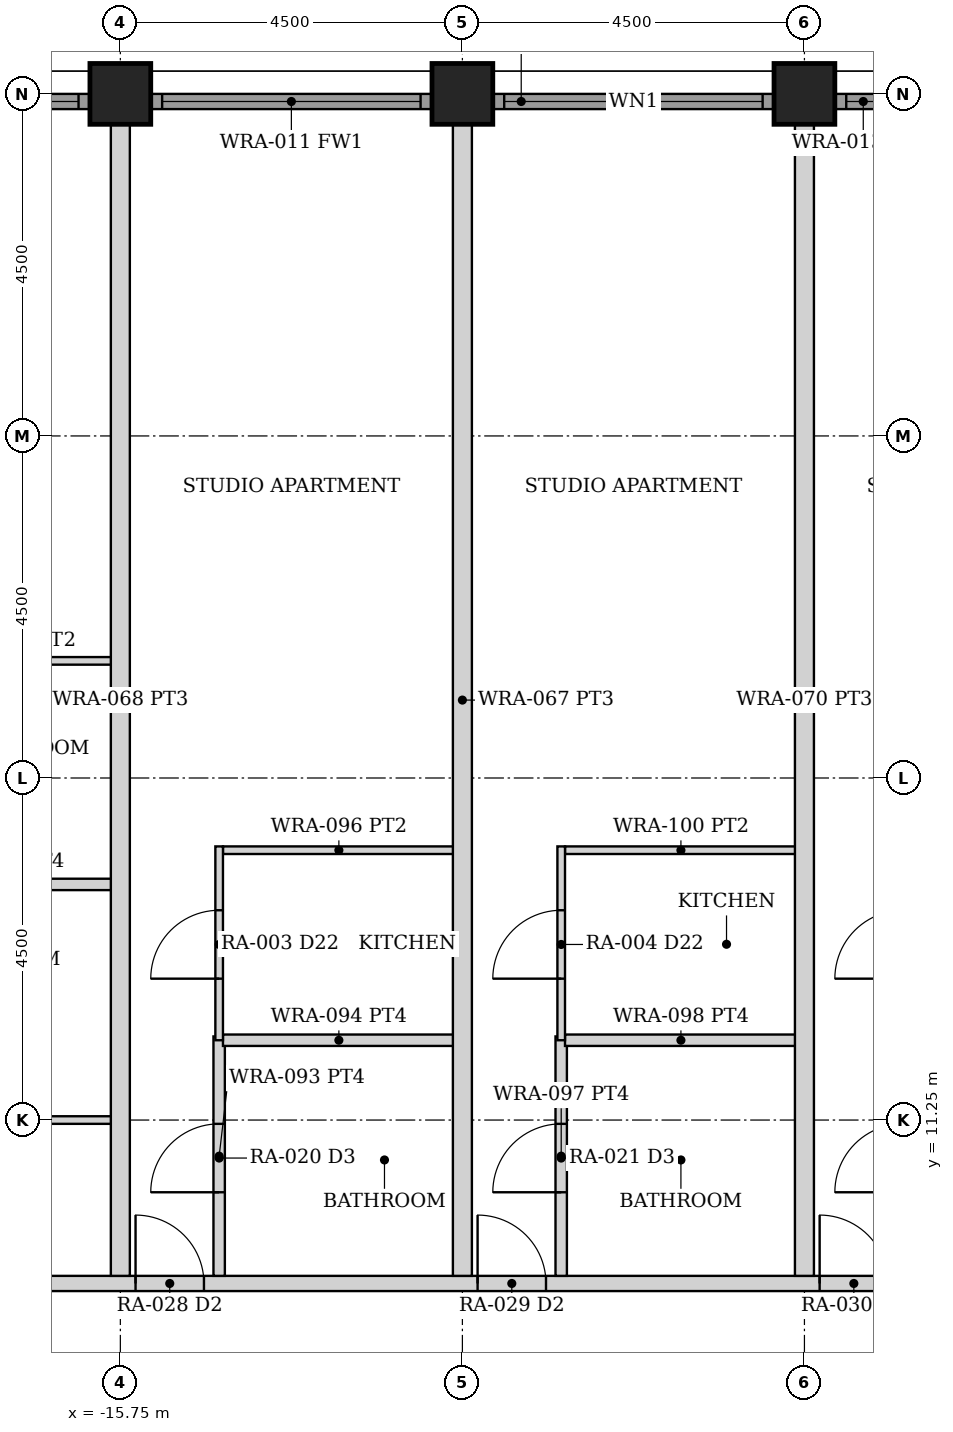
"""IFC4 building model, lengths in metres.
Left out: names, types, materials, properties, quantities, classifications, styles, units other than length and angle.
Written with IfcOpenShell. Run it as: python <this file> out.ifc"""

import sys

from ifc_helpers import new_model, si_unit, direction, frame, frame_2d, origin, origin_2d, place, context, subcontext, project, spatial, rectangle, hollow_rectangle, extrude, element, fill, save


model = new_model("IFC4")
c1 = context("Model", 3, precision=1e-05, world=origin(), true_north=direction((0.0, 1.0)))
c2 = subcontext(c1, "Body", "Model", "MODEL_VIEW")
j1 = project(units=[si_unit("LENGTHUNIT", "METRE"), si_unit("PLANEANGLEUNIT", "RADIAN")], contexts=[c1])
p1 = place(None, origin())
s1 = spatial("IfcSite", under=j1, at=p1, CompositionType="ELEMENT")
p2 = place(p1, origin())
s2 = spatial("IfcBuilding", under=s1, at=p2, CompositionType="ELEMENT")
p3 = place(p2, frame((0.0, 0.0, 26.5)))
s3 = spatial("IfcBuildingStorey", under=s2, at=p3, CompositionType="ELEMENT", Elevation=26.5)
for number, where, z_axis, x_axis in (
    (1, (-15.75, 24.75, 0.0), (0.0, 0.0, 1.0), (0.0, 1.0, 0.0)),
    (2, (-11.25, 24.75, 0.0), (0.0, 0.0, 1.0), (0.0, 1.0, 0.0)),
    (3, (-6.75, 24.75, 0.0), (0.0, 0.0, 1.0), (0.0, 1.0, 0.0)),
):
    element("IfcColumn", number, at=place(p3, frame(where, z_axis=z_axis, x_axis=x_axis)), inside=s3, PredefinedType="COLUMN", context=c2, shape_type="SweptSolid", body=[
        extrude(hollow_rectangle(XDim=0.8, YDim=0.8, WallThickness=0.08, at=origin_2d()), origin(), (0.0, 0.0, 1.0), 3.5),
    ])
p4 = place(p3, frame((-19.845, 24.65, 0.0), z_axis=(0.0, 0.0, 1.0), x_axis=(1.0, 0.0, 0.0)))
e4 = element("IfcWall", 4, at=p4, inside=s3, PredefinedType="SOLIDWALL", context=c2, shape_type="SweptSolid", body=[
    extrude(rectangle(XDim=3.69, YDim=0.2, at=frame_2d((1.845, 0.0))), origin(), (0.0, 0.0, 1.0), 2.379),
])
p5 = place(p4, frame((0.145, 0.0, 0.3)))
e5 = element("IfcOpeningElement", 5, at=p5, cuts=e4, PredefinedType="OPENING", context=c2, shape_type="SweptSolid", body=[
    extrude(rectangle(XDim=3.4, YDim=1.929, at=frame_2d((1.7, 0.964))), frame((0.0, 0.11, 0.0), z_axis=(0.0, -1.0, 0.0), x_axis=(1.0, 0.0, 0.0)), (0.0, 0.0, 1.0), 0.22),
])
p6 = place(p3, frame((-15.345, 24.65, 0.0), z_axis=(0.0, 0.0, 1.0), x_axis=(1.0, 0.0, 0.0)))
e6 = element("IfcWall", 6, at=p6, inside=s3, PredefinedType="SOLIDWALL", context=c2, shape_type="SweptSolid", body=[
    extrude(rectangle(XDim=3.69, YDim=0.2, at=frame_2d((1.845, 0.0))), origin(), (0.0, 0.0, 1.0), 2.379),
])
p7 = place(p6, frame((0.145, 0.0, 0.3)))
e7 = element("IfcOpeningElement", 7, at=p7, cuts=e6, PredefinedType="OPENING", context=c2, shape_type="SweptSolid", body=[
    extrude(rectangle(XDim=3.4, YDim=1.929, at=frame_2d((1.7, 0.964))), frame((0.0, 0.11, 0.0), z_axis=(0.0, -1.0, 0.0), x_axis=(1.0, 0.0, 0.0)), (0.0, 0.0, 1.0), 0.22),
])
p8 = place(p3, frame((-10.845, 24.65, 0.0), z_axis=(0.0, 0.0, 1.0), x_axis=(1.0, 0.0, 0.0)))
e8 = element("IfcWall", 8, at=p8, inside=s3, PredefinedType="SOLIDWALL", context=c2, shape_type="SweptSolid", body=[
    extrude(rectangle(XDim=3.69, YDim=0.2, at=frame_2d((1.845, 0.0))), origin(), (0.0, 0.0, 1.0), 2.379),
])
p9 = place(p8, frame((0.145, 0.0, 0.3)))
e9 = element("IfcOpeningElement", 9, at=p9, cuts=e8, PredefinedType="OPENING", context=c2, shape_type="SweptSolid", body=[
    extrude(rectangle(XDim=3.4, YDim=1.929, at=frame_2d((1.7, 0.964))), frame((0.0, 0.11, 0.0), z_axis=(0.0, -1.0, 0.0), x_axis=(1.0, 0.0, 0.0)), (0.0, 0.0, 1.0), 0.22),
])
p10 = place(p3, frame((-6.345, 24.65, 0.0), z_axis=(0.0, 0.0, 1.0), x_axis=(1.0, 0.0, 0.0)))
e10 = element("IfcWall", 10, at=p10, inside=s3, PredefinedType="SOLIDWALL", context=c2, shape_type="SweptSolid", body=[
    extrude(rectangle(XDim=3.69, YDim=0.2, at=frame_2d((1.845, 0.0))), origin(), (0.0, 0.0, 1.0), 2.379),
])
p11 = place(p10, frame((0.145, 0.0, 0.3)))
e11 = element("IfcOpeningElement", 11, at=p11, cuts=e10, PredefinedType="OPENING", context=c2, shape_type="SweptSolid", body=[
    extrude(rectangle(XDim=3.4, YDim=1.929, at=frame_2d((1.7, 0.964))), frame((0.0, 0.11, 0.0), z_axis=(0.0, -1.0, 0.0), x_axis=(1.0, 0.0, 0.0)), (0.0, 0.0, 1.0), 0.22),
])
p12 = place(p3, frame((-24.55, 9.1, 0.0), z_axis=(0.0, 0.0, 1.0), x_axis=(1.0, 0.0, 0.0)))
e12 = element("IfcWall", 12, at=p12, inside=s3, PredefinedType="PARTITIONING", context=c2, shape_type="SweptSolid", body=[
    extrude(rectangle(XDim=49.1, YDim=0.2, at=frame_2d((24.55, 0.0))), origin(), (0.0, 0.0, 1.0), 2.373),
])
p13 = place(p12, frame((5.1, 0.0, 0.0)))
e13 = element("IfcOpeningElement", 13, at=p13, cuts=e12, PredefinedType="OPENING", context=c2, shape_type="SweptSolid", body=[
    extrude(rectangle(XDim=0.9, YDim=2.1, at=frame_2d((0.45, 1.05))), frame((0.0, 0.11, 0.0), z_axis=(0.0, -1.0, 0.0), x_axis=(1.0, 0.0, 0.0)), (0.0, 0.0, 1.0), 0.22),
])
p14 = place(p12, frame((9.0, 0.0, 0.0)))
e14 = element("IfcOpeningElement", 14, at=p14, cuts=e12, PredefinedType="OPENING", context=c2, shape_type="SweptSolid", body=[
    extrude(rectangle(XDim=0.9, YDim=2.1, at=frame_2d((0.45, 1.05))), frame((0.0, 0.11, 0.0), z_axis=(0.0, -1.0, 0.0), x_axis=(1.0, 0.0, 0.0)), (0.0, 0.0, 1.0), 0.22),
])
p15 = place(p12, frame((13.5, 0.0, 0.0)))
e15 = element("IfcOpeningElement", 15, at=p15, cuts=e12, PredefinedType="OPENING", context=c2, shape_type="SweptSolid", body=[
    extrude(rectangle(XDim=0.9, YDim=2.1, at=frame_2d((0.45, 1.05))), frame((0.0, 0.11, 0.0), z_axis=(0.0, -1.0, 0.0), x_axis=(1.0, 0.0, 0.0)), (0.0, 0.0, 1.0), 0.22),
])
p16 = place(p12, frame((18.0, 0.0, 0.0)))
e16 = element("IfcOpeningElement", 16, at=p16, cuts=e12, PredefinedType="OPENING", context=c2, shape_type="SweptSolid", body=[
    extrude(rectangle(XDim=0.9, YDim=2.1, at=frame_2d((0.45, 1.05))), frame((0.0, 0.11, 0.0), z_axis=(0.0, -1.0, 0.0), x_axis=(1.0, 0.0, 0.0)), (0.0, 0.0, 1.0), 0.22),
])
p17 = place(p12, frame((22.5, 0.0, 0.0)))
e17 = element("IfcOpeningElement", 17, at=p17, cuts=e12, PredefinedType="OPENING", context=c2, shape_type="SweptSolid", body=[
    extrude(rectangle(XDim=0.9, YDim=2.1, at=frame_2d((0.45, 1.05))), frame((0.0, 0.11, 0.0), z_axis=(0.0, -1.0, 0.0), x_axis=(1.0, 0.0, 0.0)), (0.0, 0.0, 1.0), 0.22),
])
p18 = place(p12, frame((27.0, 0.0, 0.0)))
e18 = element("IfcOpeningElement", 18, at=p18, cuts=e12, PredefinedType="OPENING", context=c2, shape_type="SweptSolid", body=[
    extrude(rectangle(XDim=0.9, YDim=2.1, at=frame_2d((0.45, 1.05))), frame((0.0, 0.11, 0.0), z_axis=(0.0, -1.0, 0.0), x_axis=(1.0, 0.0, 0.0)), (0.0, 0.0, 1.0), 0.22),
])
p19 = place(p12, frame((31.5, 0.0, 0.0)))
e19 = element("IfcOpeningElement", 19, at=p19, cuts=e12, PredefinedType="OPENING", context=c2, shape_type="SweptSolid", body=[
    extrude(rectangle(XDim=0.9, YDim=2.1, at=frame_2d((0.45, 1.05))), frame((0.0, 0.11, 0.0), z_axis=(0.0, -1.0, 0.0), x_axis=(1.0, 0.0, 0.0)), (0.0, 0.0, 1.0), 0.22),
])
p20 = place(p12, frame((36.0, 0.0, 0.0)))
e20 = element("IfcOpeningElement", 20, at=p20, cuts=e12, PredefinedType="OPENING", context=c2, shape_type="SweptSolid", body=[
    extrude(rectangle(XDim=0.9, YDim=2.1, at=frame_2d((0.45, 1.05))), frame((0.0, 0.11, 0.0), z_axis=(0.0, -1.0, 0.0), x_axis=(1.0, 0.0, 0.0)), (0.0, 0.0, 1.0), 0.22),
])
p21 = place(p12, frame((43.1, 0.0, 0.0)))
e21 = element("IfcOpeningElement", 21, at=p21, cuts=e12, PredefinedType="OPENING", context=c2, shape_type="SweptSolid", body=[
    extrude(rectangle(XDim=0.9, YDim=2.1, at=frame_2d((0.45, 1.05))), frame((0.0, 0.11, 0.0), z_axis=(0.0, -1.0, 0.0), x_axis=(1.0, 0.0, 0.0)), (0.0, 0.0, 1.0), 0.22),
])
p22 = place(p3, frame((-24.35, 11.25, 0.0), z_axis=(0.0, 0.0, 1.0), x_axis=(1.0, 0.0, 0.0)))
e22 = element("IfcWall", 22, at=p22, inside=s3, PredefinedType="PARTITIONING", context=c2, shape_type="SweptSolid", body=[
    extrude(rectangle(XDim=8.5, YDim=0.1, at=frame_2d((4.25, 0.0))), origin(), (0.0, 0.0, 1.0), 2.373),
])
p23 = place(p22, frame((2.375, 0.0, 0.0)))
e23 = element("IfcOpeningElement", 23, at=p23, cuts=e22, PredefinedType="OPENING", context=c2, shape_type="SweptSolid", body=[
    extrude(rectangle(XDim=0.9, YDim=2.1, at=frame_2d((0.45, 1.05))), frame((0.0, 0.06, 0.0), z_axis=(0.0, -1.0, 0.0), x_axis=(1.0, 0.0, 0.0)), (0.0, 0.0, 1.0), 0.12),
])
p24 = place(p22, frame((0.35, 0.0, 0.0)))
e24 = element("IfcOpeningElement", 24, at=p24, cuts=e22, PredefinedType="OPENING", context=c2, shape_type="SweptSolid", body=[
    extrude(rectangle(XDim=0.9, YDim=2.1, at=frame_2d((0.45, 1.05))), frame((0.0, 0.06, 0.0), z_axis=(0.0, -1.0, 0.0), x_axis=(1.0, 0.0, 0.0)), (0.0, 0.0, 1.0), 0.12),
])
p25 = place(p22, frame((4.325, 0.0, 0.0)))
e25 = element("IfcOpeningElement", 25, at=p25, cuts=e22, PredefinedType="OPENING", context=c2, shape_type="SweptSolid", body=[
    extrude(rectangle(XDim=0.85, YDim=2.1, at=frame_2d((0.425, 1.05))), frame((0.0, 0.06, 0.0), z_axis=(0.0, -1.0, 0.0), x_axis=(1.0, 0.0, 0.0)), (0.0, 0.0, 1.0), 0.12),
])
p26 = place(p22, frame((6.52, 0.0, 0.0)))
e26 = element("IfcOpeningElement", 26, at=p26, cuts=e22, PredefinedType="OPENING", context=c2, shape_type="SweptSolid", body=[
    extrude(rectangle(XDim=0.9, YDim=2.1, at=frame_2d((0.45, 1.05))), frame((0.0, 0.06, 0.0), z_axis=(0.0, -1.0, 0.0), x_axis=(1.0, 0.0, 0.0)), (0.0, 0.0, 1.0), 0.12),
])
p27 = place(p3, frame((-18.95, 14.35, 0.0), z_axis=(0.0, 0.0, 1.0), x_axis=(1.0, 0.0, 0.0)))
e27 = element("IfcWall", 27, at=p27, inside=s3, PredefinedType="PARTITIONING", context=c2, shape_type="SweptSolid", body=[
    extrude(rectangle(XDim=3.14, YDim=0.15, at=frame_2d((1.57, 0.0))), origin(), (0.0, 0.0, 1.0), 2.373),
])
p28 = place(p3, frame((-18.95, 17.291, 0.0), z_axis=(0.0, 0.0, 1.0), x_axis=(1.0, 0.0, 0.0)))
e28 = element("IfcWall", 28, at=p28, inside=s3, PredefinedType="PARTITIONING", context=c2, shape_type="SweptSolid", body=[
    extrude(rectangle(XDim=3.14, YDim=0.1, at=frame_2d((1.57, 0.0))), origin(), (0.0, 0.0, 1.0), 2.373),
])
p29 = place(p3, frame((-14.45, 9.2, 0.0), z_axis=(0.0, 0.0, 1.0), x_axis=(0.0, 1.0, 0.0)))
e29 = element("IfcWall", 29, at=p29, inside=s3, PredefinedType="PARTITIONING", context=c2, shape_type="SweptSolid", body=[
    extrude(rectangle(XDim=3.15, YDim=0.15, at=frame_2d((1.575, 0.0))), origin(), (0.0, 0.0, 1.0), 2.373),
])
p30 = place(p29, frame((1.1, 0.0, 0.0)))
e30 = element("IfcOpeningElement", 30, at=p30, cuts=e29, PredefinedType="OPENING", context=c2, shape_type="SweptSolid", body=[
    extrude(rectangle(XDim=0.9, YDim=2.1, at=frame_2d((0.45, 1.05))), frame((0.0, 0.085, 0.0), z_axis=(0.0, -1.0, 0.0), x_axis=(1.0, 0.0, 0.0)), (0.0, 0.0, 1.0), 0.17),
])
p31 = place(p3, frame((-14.4, 12.3, 0.0), z_axis=(0.0, 0.0, 1.0), x_axis=(1.0, 0.0, 0.0)))
e31 = element("IfcWall", 31, at=p31, inside=s3, PredefinedType="PARTITIONING", context=c2, shape_type="SweptSolid", body=[
    extrude(rectangle(XDim=3.05, YDim=0.15, at=frame_2d((1.525, 0.0))), origin(), (0.0, 0.0, 1.0), 2.373),
])
p32 = place(p3, frame((-14.4, 14.8, 0.0), z_axis=(0.0, 0.0, 1.0), x_axis=(1.0, 0.0, 0.0)))
e32 = element("IfcWall", 32, at=p32, inside=s3, PredefinedType="PARTITIONING", context=c2, shape_type="SweptSolid", body=[
    extrude(rectangle(XDim=3.05, YDim=0.1, at=frame_2d((1.525, 0.0))), origin(), (0.0, 0.0, 1.0), 2.373),
])
p33 = place(p3, frame((-14.45, 12.3, 0.0), z_axis=(0.0, 0.0, 1.0), x_axis=(0.0, 1.0, 0.0)))
e33 = element("IfcWall", 33, at=p33, inside=s3, PredefinedType="PARTITIONING", context=c2, shape_type="SweptSolid", body=[
    extrude(rectangle(XDim=2.55, YDim=0.1, at=frame_2d((1.275, 0.0))), origin(), (0.0, 0.0, 1.0), 2.373),
])
p34 = place(p33, frame((0.81, 0.0, 0.0)))
e34 = element("IfcOpeningElement", 34, at=p34, cuts=e33, PredefinedType="OPENING", context=c2, shape_type="SweptSolid", body=[
    extrude(rectangle(XDim=0.9, YDim=2.1, at=frame_2d((0.45, 1.05))), frame((0.0, 0.06, 0.0), z_axis=(0.0, -1.0, 0.0), x_axis=(1.0, 0.0, 0.0)), (0.0, 0.0, 1.0), 0.12),
])
p35 = place(p3, frame((-9.95, 9.2, 0.0), z_axis=(0.0, 0.0, 1.0), x_axis=(0.0, 1.0, 0.0)))
e35 = element("IfcWall", 35, at=p35, inside=s3, PredefinedType="PARTITIONING", context=c2, shape_type="SweptSolid", body=[
    extrude(rectangle(XDim=3.15, YDim=0.15, at=frame_2d((1.575, 0.0))), origin(), (0.0, 0.0, 1.0), 2.373),
])
p36 = place(p35, frame((1.1, 0.0, 0.0)))
e36 = element("IfcOpeningElement", 36, at=p36, cuts=e35, PredefinedType="OPENING", context=c2, shape_type="SweptSolid", body=[
    extrude(rectangle(XDim=0.9, YDim=2.1, at=frame_2d((0.45, 1.05))), frame((0.0, 0.085, 0.0), z_axis=(0.0, -1.0, 0.0), x_axis=(1.0, 0.0, 0.0)), (0.0, 0.0, 1.0), 0.17),
])
p37 = place(p3, frame((-9.9, 12.3, 0.0), z_axis=(0.0, 0.0, 1.0), x_axis=(1.0, 0.0, 0.0)))
e37 = element("IfcWall", 37, at=p37, inside=s3, PredefinedType="PARTITIONING", context=c2, shape_type="SweptSolid", body=[
    extrude(rectangle(XDim=3.05, YDim=0.15, at=frame_2d((1.525, 0.0))), origin(), (0.0, 0.0, 1.0), 2.373),
])
p38 = place(p3, frame((-9.9, 14.8, 0.0), z_axis=(0.0, 0.0, 1.0), x_axis=(1.0, 0.0, 0.0)))
e38 = element("IfcWall", 38, at=p38, inside=s3, PredefinedType="PARTITIONING", context=c2, shape_type="SweptSolid", body=[
    extrude(rectangle(XDim=3.05, YDim=0.1, at=frame_2d((1.525, 0.0))), origin(), (0.0, 0.0, 1.0), 2.373),
])
p39 = place(p3, frame((-9.95, 12.3, 0.0), z_axis=(0.0, 0.0, 1.0), x_axis=(0.0, 1.0, 0.0)))
e39 = element("IfcWall", 39, at=p39, inside=s3, PredefinedType="PARTITIONING", context=c2, shape_type="SweptSolid", body=[
    extrude(rectangle(XDim=2.55, YDim=0.1, at=frame_2d((1.275, 0.0))), origin(), (0.0, 0.0, 1.0), 2.373),
])
p40 = place(p39, frame((0.81, 0.0, 0.0)))
e40 = element("IfcOpeningElement", 40, at=p40, cuts=e39, PredefinedType="OPENING", context=c2, shape_type="SweptSolid", body=[
    extrude(rectangle(XDim=0.9, YDim=2.1, at=frame_2d((0.45, 1.05))), frame((0.0, 0.06, 0.0), z_axis=(0.0, -1.0, 0.0), x_axis=(1.0, 0.0, 0.0)), (0.0, 0.0, 1.0), 0.12),
])
for number, where, z_axis, x_axis in (
    (41, (-15.75, 9.2, 0.0), (0.0, 0.0, 1.0), (0.0, 1.0, 0.0)),
    (42, (-11.25, 9.2, 0.0), (0.0, 0.0, 1.0), (0.0, 1.0, 0.0)),
    (43, (-6.75, 9.2, 0.0), (0.0, 0.0, 1.0), (0.0, 1.0, 0.0)),
):
    element("IfcWall", number, at=place(p3, frame(where, z_axis=z_axis, x_axis=x_axis)), inside=s3, PredefinedType="PARTITIONING", context=c2, shape_type="SweptSolid", body=[
        extrude(rectangle(XDim=15.15, YDim=0.25, at=frame_2d((7.575, 0.0))), origin(), (0.0, 0.0, 1.0), 2.373),
    ])
p41 = place(p5, origin())
e44 = element("IfcWindow", 44, at=p41, inside=s3, PartitioningType="SINGLE_PANEL", PredefinedType="WINDOW", context=c2, shape_type="SweptSolid", body=[
    extrude(rectangle(XDim=3.4, YDim=1.929, at=frame_2d((1.7, 0.964))), frame((0.0, 0.03, 0.0), z_axis=(0.0, -1.0, 0.0), x_axis=(1.0, 0.0, 0.0)), (0.0, 0.0, 1.0), 0.06),
])
fill(e5, e44)
p42 = place(p7, origin())
e45 = element("IfcWindow", 45, at=p42, inside=s3, PartitioningType="SINGLE_PANEL", PredefinedType="WINDOW", context=c2, shape_type="SweptSolid", body=[
    extrude(rectangle(XDim=3.4, YDim=1.929, at=frame_2d((1.7, 0.964))), frame((0.0, 0.03, 0.0), z_axis=(0.0, -1.0, 0.0), x_axis=(1.0, 0.0, 0.0)), (0.0, 0.0, 1.0), 0.06),
])
fill(e7, e45)
p43 = place(p9, origin())
e46 = element("IfcWindow", 46, at=p43, inside=s3, PartitioningType="SINGLE_PANEL", PredefinedType="WINDOW", context=c2, shape_type="SweptSolid", body=[
    extrude(rectangle(XDim=3.4, YDim=1.929, at=frame_2d((1.7, 0.964))), frame((0.0, 0.03, 0.0), z_axis=(0.0, -1.0, 0.0), x_axis=(1.0, 0.0, 0.0)), (0.0, 0.0, 1.0), 0.06),
])
fill(e9, e46)
p44 = place(p11, origin())
e47 = element("IfcWindow", 47, at=p44, inside=s3, PartitioningType="SINGLE_PANEL", PredefinedType="WINDOW", context=c2, shape_type="SweptSolid", body=[
    extrude(rectangle(XDim=3.4, YDim=1.929, at=frame_2d((1.7, 0.964))), frame((0.0, 0.03, 0.0), z_axis=(0.0, -1.0, 0.0), x_axis=(1.0, 0.0, 0.0)), (0.0, 0.0, 1.0), 0.06),
])
fill(e11, e47)
p45 = place(p14, origin())
e48 = element("IfcDoor", 48, at=p45, inside=s3, OperationType="SINGLE_SWING_LEFT", PredefinedType="DOOR", context=c2, shape_type="SweptSolid", body=[
    extrude(rectangle(XDim=0.9, YDim=2.1, at=frame_2d((0.45, 1.05))), frame((0.0, 0.025, 0.0), z_axis=(0.0, -1.0, 0.0), x_axis=(1.0, 0.0, 0.0)), (0.0, 0.0, 1.0), 0.05),
])
fill(e14, e48)
p46 = place(p30, origin())
e49 = element("IfcDoor", 49, at=p46, inside=s3, OperationType="SINGLE_SWING_LEFT", PredefinedType="DOOR", context=c2, shape_type="SweptSolid", body=[
    extrude(rectangle(XDim=0.9, YDim=2.1, at=frame_2d((0.45, 1.05))), frame((0.0, 0.025, 0.0), z_axis=(0.0, -1.0, 0.0), x_axis=(1.0, 0.0, 0.0)), (0.0, 0.0, 1.0), 0.05),
])
fill(e30, e49)
p47 = place(p34, origin())
e50 = element("IfcDoor", 50, at=p47, inside=s3, OperationType="SINGLE_SWING_LEFT", PredefinedType="DOOR", context=c2, shape_type="SweptSolid", body=[
    extrude(rectangle(XDim=0.9, YDim=2.1, at=frame_2d((0.45, 1.05))), frame((0.0, 0.025, 0.0), z_axis=(0.0, -1.0, 0.0), x_axis=(1.0, 0.0, 0.0)), (0.0, 0.0, 1.0), 0.05),
])
fill(e34, e50)
p48 = place(p15, origin())
e51 = element("IfcDoor", 51, at=p48, inside=s3, OperationType="SINGLE_SWING_LEFT", PredefinedType="DOOR", context=c2, shape_type="SweptSolid", body=[
    extrude(rectangle(XDim=0.9, YDim=2.1, at=frame_2d((0.45, 1.05))), frame((0.0, 0.025, 0.0), z_axis=(0.0, -1.0, 0.0), x_axis=(1.0, 0.0, 0.0)), (0.0, 0.0, 1.0), 0.05),
])
fill(e15, e51)
p49 = place(p36, origin())
e52 = element("IfcDoor", 52, at=p49, inside=s3, OperationType="SINGLE_SWING_LEFT", PredefinedType="DOOR", context=c2, shape_type="SweptSolid", body=[
    extrude(rectangle(XDim=0.9, YDim=2.1, at=frame_2d((0.45, 1.05))), frame((0.0, 0.025, 0.0), z_axis=(0.0, -1.0, 0.0), x_axis=(1.0, 0.0, 0.0)), (0.0, 0.0, 1.0), 0.05),
])
fill(e36, e52)
p50 = place(p40, origin())
e53 = element("IfcDoor", 53, at=p50, inside=s3, OperationType="SINGLE_SWING_LEFT", PredefinedType="DOOR", context=c2, shape_type="SweptSolid", body=[
    extrude(rectangle(XDim=0.9, YDim=2.1, at=frame_2d((0.45, 1.05))), frame((0.0, 0.025, 0.0), z_axis=(0.0, -1.0, 0.0), x_axis=(1.0, 0.0, 0.0)), (0.0, 0.0, 1.0), 0.05),
])
fill(e40, e53)
p51 = place(p16, origin())
e54 = element("IfcDoor", 54, at=p51, inside=s3, OperationType="SINGLE_SWING_LEFT", PredefinedType="DOOR", context=c2, shape_type="SweptSolid", body=[
    extrude(rectangle(XDim=0.9, YDim=2.1, at=frame_2d((0.45, 1.05))), frame((0.0, 0.025, 0.0), z_axis=(0.0, -1.0, 0.0), x_axis=(1.0, 0.0, 0.0)), (0.0, 0.0, 1.0), 0.05),
])
fill(e16, e54)
save(model, sys.argv[1])
